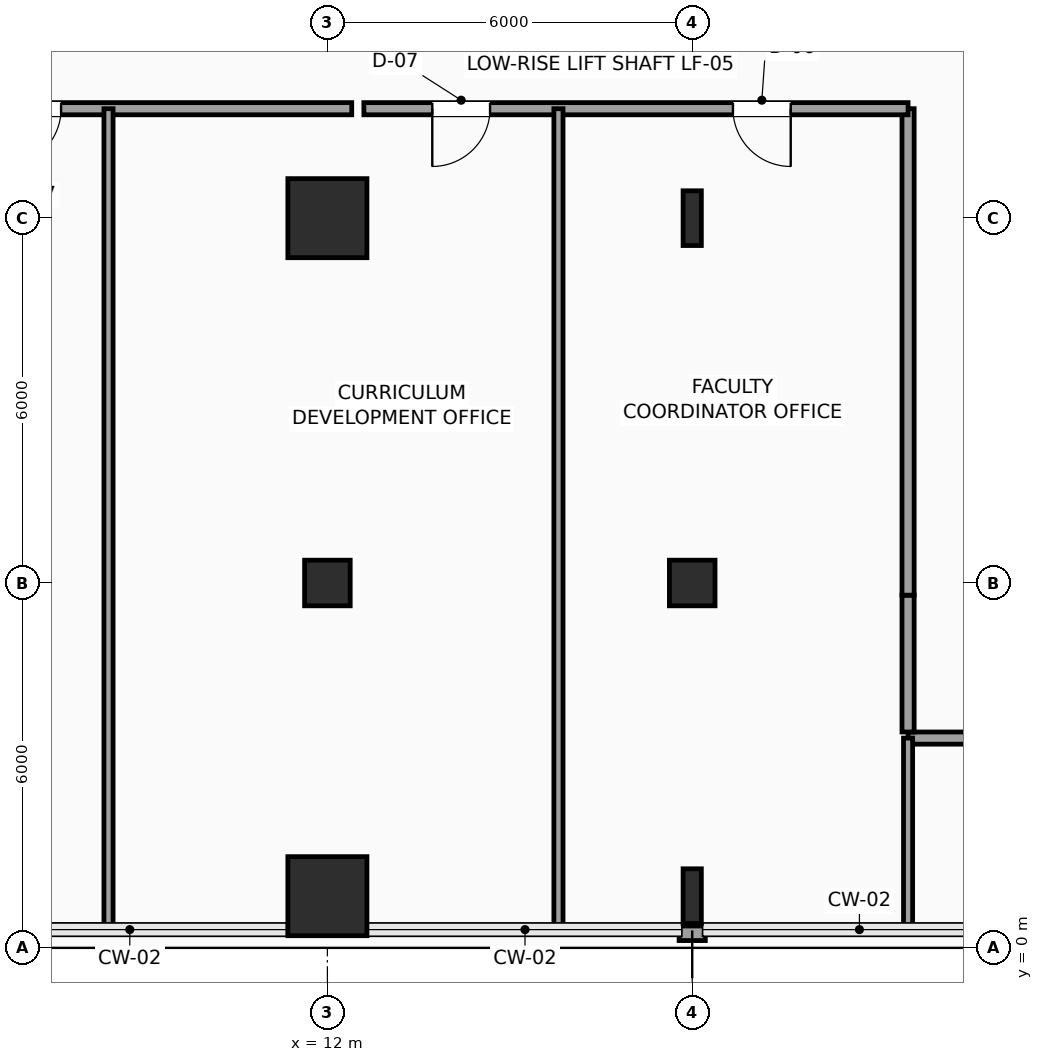
"""IFC4 building model, lengths in metres.
Left out: names, types, materials, properties, quantities, classifications, styles, units other than length and angle.
Written with IfcOpenShell. Run it as: python <this file> out.ifc"""

import sys

from ifc_helpers import new_model, si_unit, direction, frame, frame_2d, origin, origin_2d, place, context, subcontext, project, spatial, rectangle, hollow_rectangle, i_section, extrude, element, fill, save


model = new_model("IFC4")
c1 = context("Model", 3, precision=1e-05, world=origin(), true_north=direction((0.0, 1.0)))
c2 = subcontext(c1, "Body", "Model", "MODEL_VIEW")
j1 = project(units=[si_unit("LENGTHUNIT", "METRE"), si_unit("PLANEANGLEUNIT", "RADIAN")], contexts=[c1])
p1 = place(None, origin())
s1 = spatial("IfcSite", under=j1, at=p1, CompositionType="ELEMENT")
p2 = place(p1, origin())
s2 = spatial("IfcBuilding", under=s1, at=p2, CompositionType="ELEMENT")
p3 = place(p2, frame((0.0, 0.0, 55.8)))
s3 = spatial("IfcBuildingStorey", under=s2, at=p3, CompositionType="ELEMENT", Elevation=55.8)
p4 = place(p3, frame((12.0, 0.85, 0.0), z_axis=(0.0, 0.0, 1.0), x_axis=(1.0, 0.0, 0.0)))
e1 = element("IfcColumn", 1, at=p4, inside=s3, PredefinedType="COLUMN", context=c2, shape_type="SweptSolid", body=[
    extrude(rectangle(XDim=1.3, YDim=1.3, at=origin_2d()), origin(), (0.0, 0.0, 1.0), 3.9),
])
p5 = place(p3, frame((12.0, 6.0, 0.0), z_axis=(0.0, 0.0, 1.0), x_axis=(1.0, 0.0, 0.0)))
e2 = element("IfcColumn", 2, at=p5, inside=s3, PredefinedType="COLUMN", context=c2, shape_type="SweptSolid", body=[
    extrude(hollow_rectangle(XDim=0.75, YDim=0.75, WallThickness=0.035, InnerFilletRadius=0.035, OuterFilletRadius=0.05, at=origin_2d()), origin(), (0.0, 0.0, 1.0), 3.9),
])
p6 = place(p3, frame((12.0, 12.0, 0.0), z_axis=(0.0, 0.0, 1.0), x_axis=(1.0, 0.0, 0.0)))
e3 = element("IfcColumn", 3, at=p6, inside=s3, PredefinedType="COLUMN", context=c2, shape_type="SweptSolid", body=[
    extrude(rectangle(XDim=1.3, YDim=1.3, at=origin_2d()), origin(), (0.0, 0.0, 1.0), 3.9),
])
p7 = place(p3, frame((18.0, 0.85, 0.0), z_axis=(0.0, 0.0, 1.0), x_axis=(1.0, 0.0, 0.0)))
e4 = element("IfcColumn", 4, at=p7, inside=s3, PredefinedType="COLUMN", context=c2, shape_type="SweptSolid", body=[
    extrude(i_section(OverallWidth=0.3, OverallDepth=0.9, WebThickness=0.019, FlangeThickness=0.035, FilletRadius=0.03, at=origin_2d()), origin(), (0.0, 0.0, 1.0), 3.9),
])
p8 = place(p3, frame((18.0, 6.0, 0.0), z_axis=(0.0, 0.0, 1.0), x_axis=(1.0, 0.0, 0.0)))
e5 = element("IfcColumn", 5, at=p8, inside=s3, PredefinedType="COLUMN", context=c2, shape_type="SweptSolid", body=[
    extrude(hollow_rectangle(XDim=0.75, YDim=0.75, WallThickness=0.035, InnerFilletRadius=0.035, OuterFilletRadius=0.05, at=origin_2d()), origin(), (0.0, 0.0, 1.0), 3.9),
])
p9 = place(p3, frame((18.0, 12.0, 0.0), z_axis=(0.0, 0.0, 1.0), x_axis=(1.0, 0.0, 0.0)))
e6 = element("IfcColumn", 6, at=p9, inside=s3, PredefinedType="COLUMN", context=c2, shape_type="SweptSolid", body=[
    extrude(i_section(OverallWidth=0.3, OverallDepth=0.9, WebThickness=0.019, FlangeThickness=0.035, FilletRadius=0.03, at=origin_2d()), origin(), (0.0, 0.0, 1.0), 3.9),
])
p10 = place(p3, frame((18.215, 0.24, 0.0), z_axis=(0.0, 0.0, 1.0), x_axis=(-1.0, 0.0, 0.0)))
e7 = element("IfcWall", 7, at=p10, inside=s3, PredefinedType="SOLIDWALL", context=c2, shape_type="SweptSolid", body=[
    extrude(rectangle(XDim=0.43, YDim=0.24, at=frame_2d((0.215, 0.0))), origin(), (0.0, 0.0, 1.0), 3.65),
])
p11 = place(p3, frame((36.15, 3.45, 0.0), z_axis=(0.0, 0.0, 1.0), x_axis=(-1.0, 0.0, 0.0)))
e8 = element("IfcWall", 8, at=p11, inside=s3, PredefinedType="SOLIDWALL", context=c2, shape_type="SweptSolid", body=[
    extrude(rectangle(XDim=14.6, YDim=0.2, at=frame_2d((7.3, 0.0))), origin(), (0.0, 0.0, 1.0), 3.142),
])
p12 = place(p11, frame((11.3, 0.0, 0.0)))
e9 = element("IfcOpeningElement", 9, at=p12, cuts=e8, PredefinedType="OPENING", context=c2, shape_type="SweptSolid", body=[
    extrude(rectangle(XDim=0.95, YDim=2.15, at=frame_2d((0.475, 1.075))), frame((0.0, 0.11, 0.0), z_axis=(0.0, -1.0, 0.0), x_axis=(1.0, 0.0, 0.0)), (0.0, 0.0, 1.0), 0.22),
])
p13 = place(p11, frame((5.675, 0.0, 0.0)))
e10 = element("IfcOpeningElement", 10, at=p13, cuts=e8, PredefinedType="OPENING", context=c2, shape_type="SweptSolid", body=[
    extrude(rectangle(XDim=0.95, YDim=2.15, at=frame_2d((0.475, 1.075))), frame((0.0, 0.11, 0.0), z_axis=(0.0, -1.0, 0.0), x_axis=(1.0, 0.0, 0.0)), (0.0, 0.0, 1.0), 0.22),
])
p14 = place(p3, frame((21.55, 3.55, 0.0), z_axis=(0.0, 0.0, 1.0), x_axis=(0.0, 1.0, 0.0)))
e11 = element("IfcWall", 11, at=p14, inside=s3, PredefinedType="SOLIDWALL", context=c2, shape_type="SweptSolid", body=[
    extrude(rectangle(XDim=2.25, YDim=0.2, at=frame_2d((1.125, 0.0))), origin(), (0.0, 0.0, 1.0), 3.65),
])
p15 = place(p3, frame((21.55, 5.8, 0.0), z_axis=(0.0, 0.0, 1.0), x_axis=(0.0, 1.0, 0.0)))
e12 = element("IfcWall", 12, at=p15, inside=s3, PredefinedType="SOLIDWALL", context=c2, shape_type="SweptSolid", body=[
    extrude(rectangle(XDim=8.0, YDim=0.2, at=frame_2d((4.0, 0.0))), origin(), (0.0, 0.0, 1.0), 3.65),
])
p16 = place(p3, frame((21.55, 13.8, 0.0), z_axis=(0.0, 0.0, 1.0), x_axis=(-1.0, 0.0, 0.0)))
e13 = element("IfcWall", 13, at=p16, inside=s3, PredefinedType="SOLIDWALL", context=c2, shape_type="SweptSolid", body=[
    extrude(rectangle(XDim=8.95, YDim=0.2, at=frame_2d((4.475, 0.0))), origin(), (0.0, 0.0, 1.0), 3.65),
])
p17 = place(p16, frame((6.875, 0.0, 0.0)))
e14 = element("IfcOpeningElement", 14, at=p17, cuts=e13, PredefinedType="OPENING", context=c2, shape_type="SweptSolid", body=[
    extrude(rectangle(XDim=0.95, YDim=2.15, at=frame_2d((0.475, 1.075))), frame((0.0, 0.11, 0.0), z_axis=(0.0, -1.0, 0.0), x_axis=(1.0, 0.0, 0.0)), (0.0, 0.0, 1.0), 0.22),
])
p18 = place(p16, frame((1.93, 0.0, 0.0)))
e15 = element("IfcOpeningElement", 15, at=p18, cuts=e13, PredefinedType="OPENING", context=c2, shape_type="SweptSolid", body=[
    extrude(rectangle(XDim=0.95, YDim=2.15, at=frame_2d((0.475, 1.075))), frame((0.0, 0.11, 0.0), z_axis=(0.0, -1.0, 0.0), x_axis=(1.0, 0.0, 0.0)), (0.0, 0.0, 1.0), 0.22),
])
p19 = place(p3, frame((12.4, 13.8, 0.0), z_axis=(0.0, 0.0, 1.0), x_axis=(-1.0, 0.0, 0.0)))
e16 = element("IfcWall", 16, at=p19, inside=s3, PredefinedType="SOLIDWALL", context=c2, shape_type="SweptSolid", body=[
    extrude(rectangle(XDim=7.15, YDim=0.2, at=frame_2d((3.575, 0.0))), origin(), (0.0, 0.0, 1.0), 3.65),
])
p20 = place(p19, frame((4.78, 0.0, 0.0)))
e17 = element("IfcOpeningElement", 17, at=p20, cuts=e16, PredefinedType="OPENING", context=c2, shape_type="SweptSolid", body=[
    extrude(rectangle(XDim=0.95, YDim=2.15, at=frame_2d((0.475, 1.075))), frame((0.0, 0.11, 0.0), z_axis=(0.0, -1.0, 0.0), x_axis=(1.0, 0.0, 0.0)), (0.0, 0.0, 1.0), 0.22),
])
p21 = place(p3, frame((6.215, 0.314, 0.0), z_axis=(0.0, 0.0, 1.0), x_axis=(0.99998042128, -0.006257559905, 0.0)))
e18 = element("IfcWall", 18, at=p21, inside=s3, PredefinedType="PARTITIONING", context=c2, shape_type="SweptSolid", body=[
    extrude(rectangle(XDim=2.185, YDim=0.15, at=frame_2d((1.092, 0.0))), origin(), (0.0, 0.0, 1.0), 3.65),
])
for number, where, z_axis, x_axis in (
    (19, (8.4, 0.3, 0.0), (0.0, 0.0, 1.0), (0.0, 1.0, 0.0)),
    (20, (15.8, 0.3, 0.0), (0.0, 0.0, 1.0), (0.0, 1.0, 0.0)),
):
    element("IfcWall", number, at=place(p3, frame(where, z_axis=z_axis, x_axis=x_axis)), inside=s3, PredefinedType="PARTITIONING", context=c2, shape_type="SweptSolid", body=[
        extrude(rectangle(XDim=13.5, YDim=0.15, at=frame_2d((6.75, 0.0))), origin(), (0.0, 0.0, 1.0), 3.65),
    ])
p22 = place(p3, frame((21.55, 0.3, 0.0), z_axis=(0.0, 0.0, 1.0), x_axis=(0.0, 1.0, 0.0)))
e21 = element("IfcWall", 21, at=p22, inside=s3, PredefinedType="PARTITIONING", context=c2, shape_type="SweptSolid", body=[
    extrude(rectangle(XDim=3.15, YDim=0.15, at=frame_2d((1.575, 0.0))), origin(), (0.0, 0.0, 1.0), 3.65),
])
p23 = place(p17, origin())
e22 = element("IfcDoor", 22, at=p23, inside=s3, OperationType="SINGLE_SWING_RIGHT", PredefinedType="DOOR", context=c2, shape_type="SweptSolid", body=[
    extrude(rectangle(XDim=0.95, YDim=2.15, at=frame_2d((0.475, 1.075))), frame((0.0, 0.025, 0.0), z_axis=(0.0, -1.0, 0.0), x_axis=(1.0, 0.0, 0.0)), (0.0, 0.0, 1.0), 0.05),
])
fill(e14, e22)
p24 = place(p18, origin())
e23 = element("IfcDoor", 23, at=p24, inside=s3, OperationType="SINGLE_SWING_LEFT", PredefinedType="DOOR", context=c2, shape_type="SweptSolid", body=[
    extrude(rectangle(XDim=0.95, YDim=2.15, at=frame_2d((0.475, 1.075))), frame((0.0, 0.025, 0.0), z_axis=(0.0, -1.0, 0.0), x_axis=(1.0, 0.0, 0.0)), (0.0, 0.0, 1.0), 0.05),
])
fill(e15, e23)
p25 = place(p20, origin())
e24 = element("IfcDoor", 24, at=p25, inside=s3, OperationType="SINGLE_SWING_RIGHT", PredefinedType="DOOR", context=c2, shape_type="SweptSolid", body=[
    extrude(rectangle(XDim=0.95, YDim=2.15, at=frame_2d((0.475, 1.075))), frame((0.0, 0.025, 0.0), z_axis=(0.0, -1.0, 0.0), x_axis=(1.0, 0.0, 0.0)), (0.0, 0.0, 1.0), 0.05),
])
fill(e17, e24)
save(model, sys.argv[1])
